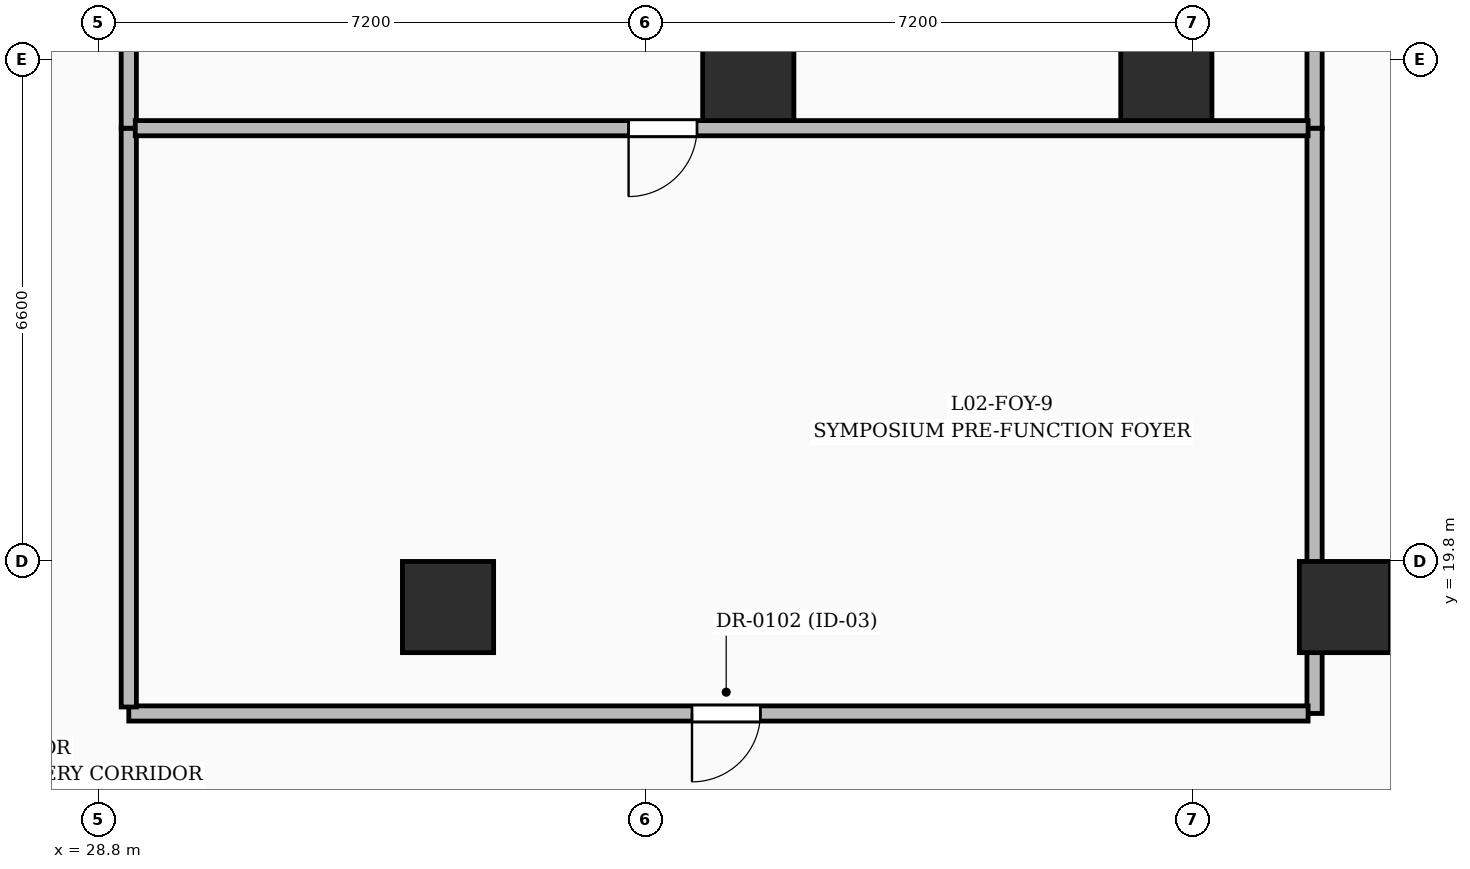
"""IFC4 building model, lengths in metres.
Left out: names, types, materials, properties, quantities, classifications, styles, units other than length and angle.
Written with IfcOpenShell. Run it as: python <this file> out.ifc"""

import sys

from ifc_helpers import new_model, si_unit, direction, frame, frame_2d, origin, origin_2d, place, context, subcontext, project, spatial, rectangle, extrude, element, fill, save


model = new_model("IFC4")
c1 = context("Model", 3, precision=1e-05, world=origin(), true_north=direction((0.0, 1.0)))
c2 = subcontext(c1, "Body", "Model", "MODEL_VIEW")
j1 = project(units=[si_unit("LENGTHUNIT", "METRE"), si_unit("PLANEANGLEUNIT", "RADIAN")], contexts=[c1])
p1 = place(None, origin())
s1 = spatial("IfcSite", under=j1, at=p1, CompositionType="ELEMENT")
p2 = place(p1, origin())
s2 = spatial("IfcBuilding", under=s1, at=p2, CompositionType="ELEMENT")
p3 = place(p2, frame((0.0, 0.0, 12.9)))
s3 = spatial("IfcBuildingStorey", under=s2, at=p3, CompositionType="ELEMENT", Elevation=12.9)
for number, where, z_axis, x_axis in (
    (1, (45.2, 19.2, 0.0), (0.0, 0.0, 1.0), (1.0, 0.0, 0.0)),
    (2, (42.85, 26.2, 0.0), (0.0, 0.0, 1.0), (1.0, 0.0, 0.0)),
    (3, (37.35, 26.2, 0.0), (0.0, 0.0, 1.0), (1.0, 0.0, 0.0)),
    (4, (33.4, 19.2, 0.0), (0.0, 0.0, 1.0), (1.0, 0.0, 0.0)),
):
    element("IfcColumn", number, at=place(p3, frame(where, z_axis=z_axis, x_axis=x_axis)), inside=s3, PredefinedType="COLUMN", context=c2, shape_type="SweptSolid", body=[
        extrude(rectangle(XDim=1.2, YDim=1.2, at=origin_2d()), origin(), (0.0, 0.0, 1.0), 4.5),
    ])
p4 = place(p3, frame((44.8, 25.5, 0.0), z_axis=(0.0, 0.0, 1.0), x_axis=(0.0, -1.0, 0.0)))
e5 = element("IfcWall", 5, at=p4, inside=s3, PredefinedType="PARTITIONING", context=c2, shape_type="SweptSolid", body=[
    extrude(rectangle(XDim=7.7, YDim=0.2, at=frame_2d((3.85, 0.0))), origin(), (0.0, 0.0, 1.0), 3.159),
])
p5 = place(p3, frame((44.715, 17.8, 0.0), z_axis=(0.0, 0.0, 1.0), x_axis=(-1.0, 0.0, 0.0)))
e6 = element("IfcWall", 6, at=p5, inside=s3, PredefinedType="PARTITIONING", context=c2, shape_type="SweptSolid", body=[
    extrude(rectangle(XDim=15.515, YDim=0.2, at=frame_2d((7.758, 0.0))), origin(), (0.0, 0.0, 1.0), 3.159),
])
p6 = place(p5, frame((7.205, 0.0, 0.0)))
e7 = element("IfcOpeningElement", 7, at=p6, cuts=e6, PredefinedType="OPENING", context=c2, shape_type="SweptSolid", body=[
    extrude(rectangle(XDim=0.9, YDim=2.1, at=frame_2d((0.45, 1.05))), frame((0.0, 0.11, 0.0), z_axis=(0.0, -1.0, 0.0), x_axis=(1.0, 0.0, 0.0)), (0.0, 0.0, 1.0), 0.22),
])
p7 = place(p3, frame((29.2, 17.885, 0.0), z_axis=(0.0, 0.0, 1.0), x_axis=(0.0, 1.0, 0.0)))
e8 = element("IfcWall", 8, at=p7, inside=s3, PredefinedType="PARTITIONING", context=c2, shape_type="SweptSolid", body=[
    extrude(rectangle(XDim=7.615, YDim=0.2, at=frame_2d((3.808, 0.0))), origin(), (0.0, 0.0, 1.0), 3.078),
])
p8 = place(p3, frame((29.2, 25.5, 0.0), z_axis=(0.0, 0.0, 1.0), x_axis=(0.0, 1.0, 0.0)))
e9 = element("IfcWall", 9, at=p8, inside=s3, PredefinedType="PARTITIONING", context=c2, shape_type="SweptSolid", body=[
    extrude(rectangle(XDim=5.5, YDim=0.2, at=frame_2d((2.75, 0.0))), origin(), (0.0, 0.0, 1.0), 3.637),
])
p9 = place(p3, frame((44.8, 30.915, 0.0), z_axis=(0.0, 0.0, 1.0), x_axis=(0.0, -1.0, 0.0)))
e10 = element("IfcWall", 10, at=p9, inside=s3, PredefinedType="PARTITIONING", context=c2, shape_type="SweptSolid", body=[
    extrude(rectangle(XDim=5.415, YDim=0.2, at=frame_2d((2.708, 0.0))), origin(), (0.0, 0.0, 1.0), 3.637),
])
p10 = place(p3, frame((44.715, 25.5, 0.0), z_axis=(0.0, 0.0, 1.0), x_axis=(-1.0, 0.0, 0.0)))
e11 = element("IfcWall", 11, at=p10, inside=s3, PredefinedType="PARTITIONING", context=c2, shape_type="SweptSolid", body=[
    extrude(rectangle(XDim=15.43, YDim=0.2, at=frame_2d((7.715, 0.0))), origin(), (0.0, 0.0, 1.0), 3.159),
])
p11 = place(p10, frame((8.04, 0.0, 0.0)))
e12 = element("IfcOpeningElement", 12, at=p11, cuts=e11, PredefinedType="OPENING", context=c2, shape_type="SweptSolid", body=[
    extrude(rectangle(XDim=0.9, YDim=2.1, at=frame_2d((0.45, 1.05))), frame((0.0, 0.11, 0.0), z_axis=(0.0, -1.0, 0.0), x_axis=(1.0, 0.0, 0.0)), (0.0, 0.0, 1.0), 0.22),
])
p12 = place(p6, origin())
e13 = element("IfcDoor", 13, at=p12, inside=s3, OperationType="SINGLE_SWING_RIGHT", PredefinedType="DOOR", context=c2, shape_type="SweptSolid", body=[
    extrude(rectangle(XDim=0.9, YDim=2.1, at=frame_2d((0.45, 1.05))), frame((0.0, 0.025, 0.0), z_axis=(0.0, -1.0, 0.0), x_axis=(1.0, 0.0, 0.0)), (0.0, 0.0, 1.0), 0.05),
])
fill(e7, e13)
p13 = place(p11, origin())
e14 = element("IfcDoor", 14, at=p13, inside=s3, OperationType="SINGLE_SWING_RIGHT", PredefinedType="DOOR", context=c2, shape_type="SweptSolid", body=[
    extrude(rectangle(XDim=0.9, YDim=2.1, at=frame_2d((0.45, 1.05))), frame((0.0, 0.025, 0.0), z_axis=(0.0, -1.0, 0.0), x_axis=(1.0, 0.0, 0.0)), (0.0, 0.0, 1.0), 0.05),
])
fill(e12, e14)
save(model, sys.argv[1])
